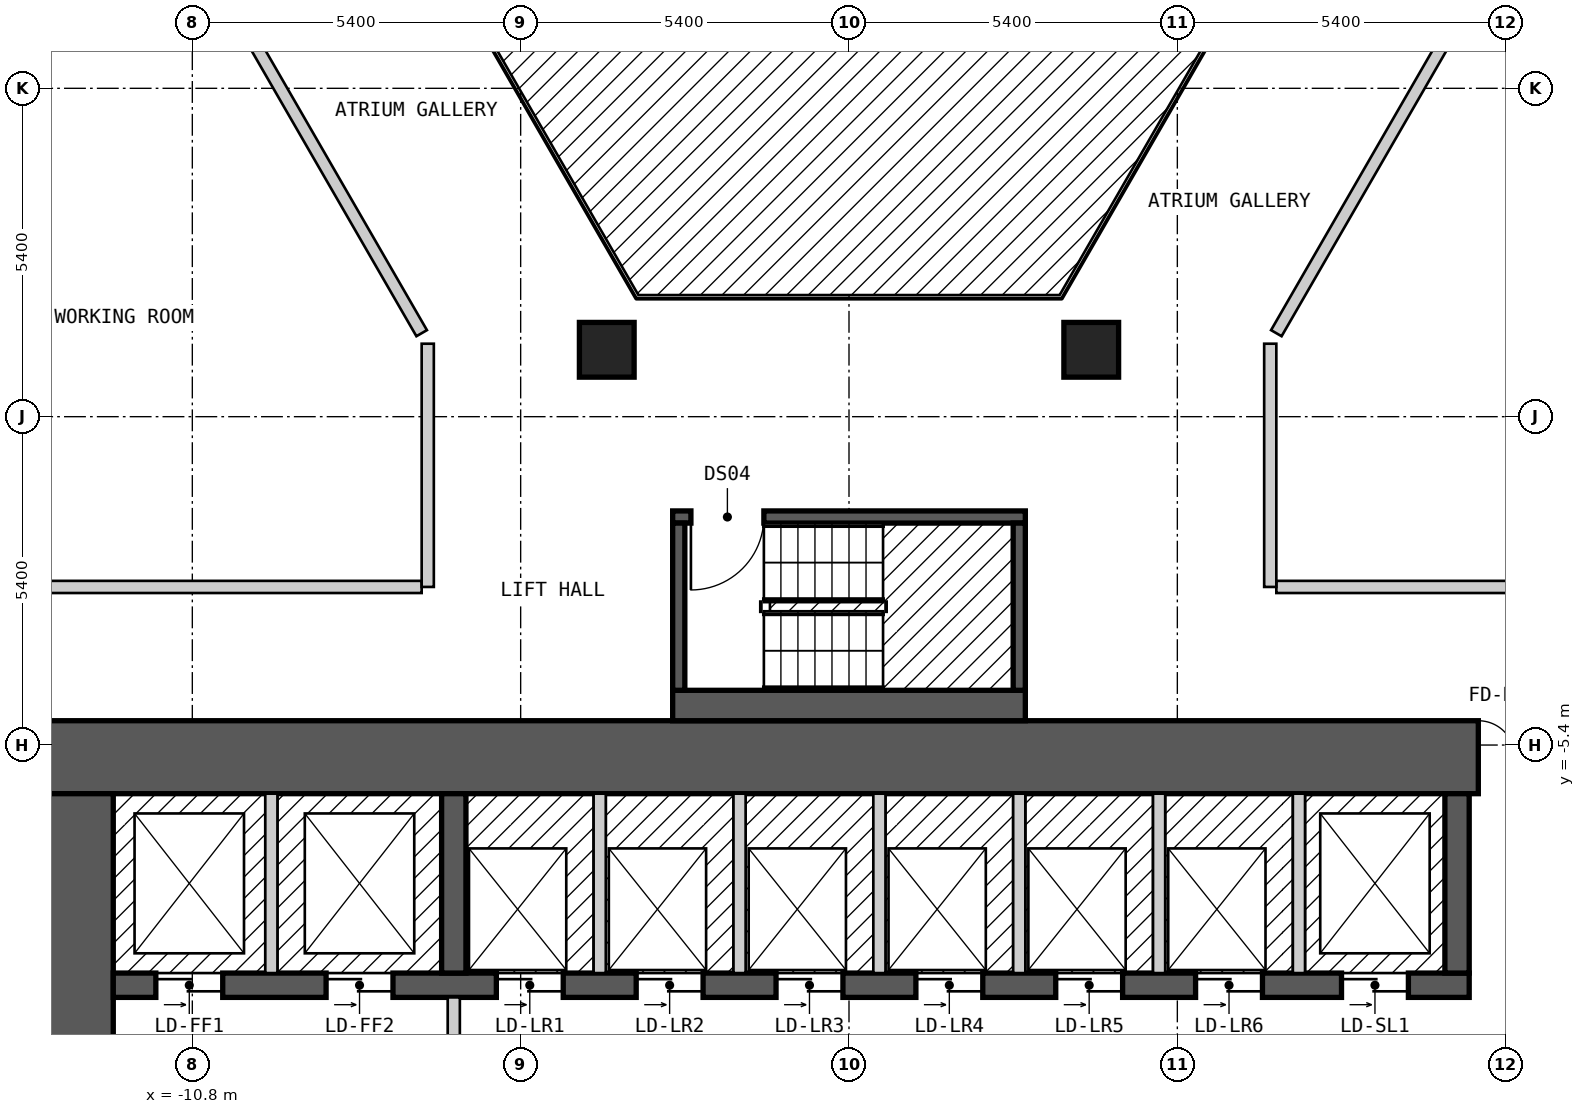
"""IFC4 building model, lengths in metres.
Left out: names, types, materials, properties, quantities, classifications, styles, units other than length and angle.
Written with IfcOpenShell. Run it as: python <this file> out.ifc"""

import sys

from ifc_helpers import new_model, si_unit, direction, frame, frame_2d, origin, origin_2d, place, context, subcontext, project, spatial, rectangle, extrude, element, fill, save


model = new_model("IFC4")
c1 = context("Model", 3, precision=1e-05, world=origin(), true_north=direction((0.0, 1.0)))
c2 = subcontext(c1, "Body", "Model", "MODEL_VIEW")
j1 = project(units=[si_unit("LENGTHUNIT", "METRE"), si_unit("PLANEANGLEUNIT", "RADIAN")], contexts=[c1])
p1 = place(None, origin())
s1 = spatial("IfcSite", under=j1, at=p1, CompositionType="ELEMENT")
p2 = place(p1, origin())
s2 = spatial("IfcBuilding", under=s1, at=p2, CompositionType="ELEMENT")
p3 = place(p2, frame((0.0, 0.0, 32.4)))
s3 = spatial("IfcBuildingStorey", under=s2, at=p3, CompositionType="ELEMENT", Elevation=32.4)
for number, where, z_axis, x_axis in (
    (1, (3.984, 1.1, 0.0), (0.0, 0.0, 1.0), (1.0, 0.0, 0.0)),
    (2, (-3.984, 1.1, 0.0), (0.0, 0.0, 1.0), (1.0, 0.0, 0.0)),
):
    element("IfcColumn", number, at=place(p3, frame(where, z_axis=z_axis, x_axis=x_axis)), inside=s3, PredefinedType="COLUMN", context=c2, shape_type="SweptSolid", body=[
        extrude(rectangle(XDim=0.9, YDim=0.9, at=origin_2d()), origin(), (0.0, 0.0, 1.0), 3.0),
    ])
p4 = place(p3, frame((-13.3, -5.6, 0.0), z_axis=(0.0, 0.0, 1.0), x_axis=(1.0, 0.0, 0.0)))
e3 = element("IfcWall", 3, at=p4, inside=s3, PredefinedType="SHEAR", context=c2, shape_type="SweptSolid", body=[
    extrude(rectangle(XDim=26.6, YDim=1.2, at=frame_2d((13.3, 0.0))), origin(), (0.0, 0.0, 1.0), 2.7),
])
p5 = place(p4, frame((23.65, 0.0, 0.0)))
e4 = element("IfcOpeningElement", 4, at=p5, cuts=e3, PredefinedType="OPENING", context=c2, shape_type="SweptSolid", body=[
    extrude(rectangle(XDim=1.2, YDim=2.1, at=frame_2d((0.6, 1.05))), frame((0.0, 0.61, 0.0), z_axis=(0.0, -1.0, 0.0), x_axis=(1.0, 0.0, 0.0)), (0.0, 0.0, 1.0), 1.22),
])
p6 = place(p3, frame((-12.7, -17.8, 0.0), z_axis=(0.0, 0.0, 1.0), x_axis=(0.0, 1.0, 0.0)))
e5 = element("IfcWall", 5, at=p6, inside=s3, PredefinedType="SHEAR", context=c2, shape_type="SweptSolid", body=[
    extrude(rectangle(XDim=11.6, YDim=1.2, at=frame_2d((5.8, 0.0))), origin(), (0.0, 0.0, 1.0), 2.7),
])
p7 = place(p6, frame((3.6, 0.0, 0.0)))
e6 = element("IfcOpeningElement", 6, at=p7, cuts=e5, PredefinedType="OPENING", context=c2, shape_type="SweptSolid", body=[
    extrude(rectangle(XDim=1.2, YDim=2.1, at=frame_2d((0.6, 1.05))), frame((0.0, 0.61, 0.0), z_axis=(0.0, -1.0, 0.0), x_axis=(1.0, 0.0, 0.0)), (0.0, 0.0, 1.0), 1.22),
])
p8 = place(p3, frame((-12.1, -9.35, 0.0), z_axis=(0.0, 0.0, 1.0), x_axis=(1.0, 0.0, 0.0)))
e7 = element("IfcWall", 7, at=p8, inside=s3, PredefinedType="SHEAR", context=c2, shape_type="SweptSolid", body=[
    extrude(rectangle(XDim=22.3, YDim=0.4, at=frame_2d((11.15, 0.0))), origin(), (0.0, 0.0, 1.0), 2.7),
])
p9 = place(p8, frame((0.7, 0.0, 0.0)))
e8 = element("IfcOpeningElement", 8, at=p9, cuts=e7, PredefinedType="OPENING", context=c2, shape_type="SweptSolid", body=[
    extrude(rectangle(XDim=1.1, YDim=2.1, at=frame_2d((0.55, 1.05))), frame((0.0, 0.21, 0.0), z_axis=(0.0, -1.0, 0.0), x_axis=(1.0, 0.0, 0.0)), (0.0, 0.0, 1.0), 0.42),
])
p10 = place(p8, frame((3.5, 0.0, 0.0)))
e9 = element("IfcOpeningElement", 9, at=p10, cuts=e7, PredefinedType="OPENING", context=c2, shape_type="SweptSolid", body=[
    extrude(rectangle(XDim=1.1, YDim=2.1, at=frame_2d((0.55, 1.05))), frame((0.0, 0.21, 0.0), z_axis=(0.0, -1.0, 0.0), x_axis=(1.0, 0.0, 0.0)), (0.0, 0.0, 1.0), 0.42),
])
p11 = place(p8, frame((6.3, 0.0, 0.0)))
e10 = element("IfcOpeningElement", 10, at=p11, cuts=e7, PredefinedType="OPENING", context=c2, shape_type="SweptSolid", body=[
    extrude(rectangle(XDim=1.1, YDim=2.1, at=frame_2d((0.55, 1.05))), frame((0.0, 0.21, 0.0), z_axis=(0.0, -1.0, 0.0), x_axis=(1.0, 0.0, 0.0)), (0.0, 0.0, 1.0), 0.42),
])
p12 = place(p8, frame((8.6, 0.0, 0.0)))
e11 = element("IfcOpeningElement", 11, at=p12, cuts=e7, PredefinedType="OPENING", context=c2, shape_type="SweptSolid", body=[
    extrude(rectangle(XDim=1.1, YDim=2.1, at=frame_2d((0.55, 1.05))), frame((0.0, 0.21, 0.0), z_axis=(0.0, -1.0, 0.0), x_axis=(1.0, 0.0, 0.0)), (0.0, 0.0, 1.0), 0.42),
])
p13 = place(p8, frame((10.9, 0.0, 0.0)))
e12 = element("IfcOpeningElement", 12, at=p13, cuts=e7, PredefinedType="OPENING", context=c2, shape_type="SweptSolid", body=[
    extrude(rectangle(XDim=1.1, YDim=2.1, at=frame_2d((0.55, 1.05))), frame((0.0, 0.21, 0.0), z_axis=(0.0, -1.0, 0.0), x_axis=(1.0, 0.0, 0.0)), (0.0, 0.0, 1.0), 0.42),
])
p14 = place(p8, frame((13.2, 0.0, 0.0)))
e13 = element("IfcOpeningElement", 13, at=p14, cuts=e7, PredefinedType="OPENING", context=c2, shape_type="SweptSolid", body=[
    extrude(rectangle(XDim=1.1, YDim=2.1, at=frame_2d((0.55, 1.05))), frame((0.0, 0.21, 0.0), z_axis=(0.0, -1.0, 0.0), x_axis=(1.0, 0.0, 0.0)), (0.0, 0.0, 1.0), 0.42),
])
p15 = place(p8, frame((15.5, 0.0, 0.0)))
e14 = element("IfcOpeningElement", 14, at=p15, cuts=e7, PredefinedType="OPENING", context=c2, shape_type="SweptSolid", body=[
    extrude(rectangle(XDim=1.1, YDim=2.1, at=frame_2d((0.55, 1.05))), frame((0.0, 0.21, 0.0), z_axis=(0.0, -1.0, 0.0), x_axis=(1.0, 0.0, 0.0)), (0.0, 0.0, 1.0), 0.42),
])
p16 = place(p8, frame((17.8, 0.0, 0.0)))
e15 = element("IfcOpeningElement", 15, at=p16, cuts=e7, PredefinedType="OPENING", context=c2, shape_type="SweptSolid", body=[
    extrude(rectangle(XDim=1.1, YDim=2.1, at=frame_2d((0.55, 1.05))), frame((0.0, 0.21, 0.0), z_axis=(0.0, -1.0, 0.0), x_axis=(1.0, 0.0, 0.0)), (0.0, 0.0, 1.0), 0.42),
])
p17 = place(p8, frame((20.2, 0.0, 0.0)))
e16 = element("IfcOpeningElement", 16, at=p17, cuts=e7, PredefinedType="OPENING", context=c2, shape_type="SweptSolid", body=[
    extrude(rectangle(XDim=1.1, YDim=2.1, at=frame_2d((0.55, 1.05))), frame((0.0, 0.21, 0.0), z_axis=(0.0, -1.0, 0.0), x_axis=(1.0, 0.0, 0.0)), (0.0, 0.0, 1.0), 0.42),
])
for number, where, z_axis, x_axis in (
    (17, (-6.5, -9.15, 0.0), (0.0, 0.0, 1.0), (0.0, 1.0, 0.0)),
    (18, (10.0, -9.15, 0.0), (0.0, 0.0, 1.0), (0.0, 1.0, 0.0)),
):
    element("IfcWall", number, at=place(p3, frame(where, z_axis=z_axis, x_axis=x_axis)), inside=s3, PredefinedType="SHEAR", context=c2, shape_type="SweptSolid", body=[
        extrude(rectangle(XDim=2.95, YDim=0.4, at=frame_2d((1.475, 0.0))), origin(), (0.0, 0.0, 1.0), 2.7),
    ])
p18 = place(p3, frame((-2.9, -4.75, 0.0), z_axis=(0.0, 0.0, 1.0), x_axis=(1.0, 0.0, 0.0)))
e19 = element("IfcWall", 19, at=p18, inside=s3, PredefinedType="SOLIDWALL", context=c2, shape_type="SweptSolid", body=[
    extrude(rectangle(XDim=5.8, YDim=0.5, at=frame_2d((2.9, 0.0))), origin(), (0.0, 0.0, 1.0), 2.7),
])
p19 = place(p3, frame((-2.9, -1.65, 0.0), z_axis=(0.0, 0.0, 1.0), x_axis=(1.0, 0.0, 0.0)))
e20 = element("IfcWall", 20, at=p19, inside=s3, PredefinedType="SOLIDWALL", context=c2, shape_type="SweptSolid", body=[
    extrude(rectangle(XDim=5.8, YDim=0.2, at=frame_2d((2.9, 0.0))), origin(), (0.0, 0.0, 1.0), 2.7),
])
p20 = place(p19, frame((0.3, 0.0, 0.0)))
e21 = element("IfcOpeningElement", 21, at=p20, cuts=e20, PredefinedType="OPENING", context=c2, shape_type="SweptSolid", body=[
    extrude(rectangle(XDim=1.2, YDim=2.1, at=frame_2d((0.6, 1.05))), frame((0.0, 0.11, 0.0), z_axis=(0.0, -1.0, 0.0), x_axis=(1.0, 0.0, 0.0)), (0.0, 0.0, 1.0), 0.22),
])
for number, where, z_axis, x_axis in (
    (22, (-2.8, -4.5, 0.0), (0.0, 0.0, 1.0), (0.0, 1.0, 0.0)),
    (23, (2.8, -4.5, 0.0), (0.0, 0.0, 1.0), (0.0, 1.0, 0.0)),
):
    element("IfcWall", number, at=place(p3, frame(where, z_axis=z_axis, x_axis=x_axis)), inside=s3, PredefinedType="SOLIDWALL", context=c2, shape_type="SweptSolid", body=[
        extrude(rectangle(XDim=2.75, YDim=0.2, at=frame_2d((1.375, 0.0))), origin(), (0.0, 0.0, 1.0), 2.7),
    ])
p21 = place(p3, frame((-10.796, 7.9, 0.0), z_axis=(0.0, 0.0, 1.0), x_axis=(0.499954271211, -0.866051803703, 0.0)))
e24 = element("IfcWall", 24, at=p21, inside=s3, PredefinedType="PARTITIONING", context=c2, shape_type="SweptSolid", body=[
    extrude(rectangle(XDim=7.536, YDim=0.2, at=frame_2d((3.768, 0.0))), origin(), (0.0, 0.0, 1.0), 2.7),
])
p22 = place(p3, frame((9.18, 15.7, 0.0), z_axis=(0.0, 0.0, 1.0), x_axis=(0.500003652032, -0.866023295272, 0.0)))
e25 = element("IfcWall", 25, at=p22, inside=s3, PredefinedType="PARTITIONING", context=c2, shape_type="SweptSolid", body=[
    extrude(rectangle(XDim=18.012, YDim=0.2, at=frame_2d((9.006, 0.0))), origin(), (0.0, 0.0, 1.0), 2.7),
])
p23 = place(p22, frame((8.556, 0.0, 0.0)))
e26 = element("IfcOpeningElement", 26, at=p23, cuts=e25, PredefinedType="OPENING", context=c2, shape_type="SweptSolid", body=[
    extrude(rectangle(XDim=0.9, YDim=2.1, at=frame_2d((0.45, 1.05))), frame((0.0, 0.11, 0.0), z_axis=(0.0, -1.0, 0.0), x_axis=(1.0, 0.0, 0.0)), (0.0, 0.0, 1.0), 0.22),
])
p24 = place(p3, frame((10.45, 17.9, 0.0), z_axis=(0.0, 0.0, 1.0), x_axis=(0.500034352617, -0.866005569383, 0.0)))
e27 = element("IfcWall", 27, at=p24, inside=s3, PredefinedType="PARTITIONING", context=c2, shape_type="SweptSolid", body=[
    extrude(rectangle(XDim=20.553, YDim=0.2, at=frame_2d((10.276, 0.0))), origin(), (0.0, 0.0, 1.0), 2.7),
])
p25 = place(p24, frame((9.775, 0.0, 0.0)))
e28 = element("IfcOpeningElement", 28, at=p25, cuts=e27, PredefinedType="OPENING", context=c2, shape_type="SweptSolid", body=[
    extrude(rectangle(XDim=1.0, YDim=2.1, at=frame_2d((0.5, 1.05))), frame((0.0, 0.11, 0.0), z_axis=(0.0, -1.0, 0.0), x_axis=(1.0, 0.0, 0.0)), (0.0, 0.0, 1.0), 0.22),
])
p26 = place(p24, frame((0.852, 0.0, 0.0)))
e29 = element("IfcOpeningElement", 29, at=p26, cuts=e27, PredefinedType="OPENING", context=c2, shape_type="SweptSolid", body=[
    extrude(rectangle(XDim=0.8, YDim=2.1, at=frame_2d((0.4, 1.05))), frame((0.0, 0.11, 0.0), z_axis=(0.0, -1.0, 0.0), x_axis=(1.0, 0.0, 0.0)), (0.0, 0.0, 1.0), 0.22),
])
for number, where, z_axis, x_axis in (
    (30, (-15.4, -2.8, 0.0), (0.0, 0.0, 1.0), (1.0, 0.0, 0.0)),
    (31, (7.028, -2.8, 0.0), (0.0, 0.0, 1.0), (1.0, 0.0, 0.0)),
):
    element("IfcWall", number, at=place(p3, frame(where, z_axis=z_axis, x_axis=x_axis)), inside=s3, PredefinedType="PARTITIONING", context=c2, shape_type="SweptSolid", body=[
        extrude(rectangle(XDim=8.372, YDim=0.2, at=frame_2d((4.186, 0.0))), origin(), (0.0, 0.0, 1.0), 2.7),
    ])
p27 = place(p3, frame((7.028, 1.373, 0.0), z_axis=(0.0, 0.0, 1.0), x_axis=(0.49998574534, 0.86603363356, 0.0)))
e32 = element("IfcWall", 32, at=p27, inside=s3, PredefinedType="PARTITIONING", context=c2, shape_type="SweptSolid", body=[
    extrude(rectangle(XDim=7.652, YDim=0.2, at=frame_2d((3.826, 0.0))), origin(), (0.0, 0.0, 1.0), 2.7),
])
p28 = place(p3, frame((-18.244, -0.001, 0.0), z_axis=(0.0, 0.0, 1.0), x_axis=(0.499962999376, 0.866046765051, 0.0)))
e33 = element("IfcWall", 33, at=p28, inside=s3, PredefinedType="PARTITIONING", context=c2, shape_type="SweptSolid", body=[
    extrude(rectangle(XDim=18.245, YDim=0.2, at=frame_2d((9.123, 0.0))), origin(), (0.0, 0.0, 1.0), 2.7),
])
p29 = place(p28, frame((8.672, 0.0, 0.0)))
e34 = element("IfcOpeningElement", 34, at=p29, cuts=e33, PredefinedType="OPENING", context=c2, shape_type="SweptSolid", body=[
    extrude(rectangle(XDim=0.9, YDim=2.1, at=frame_2d((0.45, 1.05))), frame((0.0, 0.11, 0.0), z_axis=(0.0, -1.0, 0.0), x_axis=(1.0, 0.0, 0.0)), (0.0, 0.0, 1.0), 0.22),
])
p30 = place(p3, frame((-20.727, 0.099, 0.0), z_axis=(0.0, 0.0, 1.0), x_axis=(0.499993204491, 0.866029327138, 0.0)))
e35 = element("IfcWall", 35, at=p30, inside=s3, PredefinedType="PARTITIONING", context=c2, shape_type="SweptSolid", body=[
    extrude(rectangle(XDim=20.554, YDim=0.2, at=frame_2d((10.277, 0.0))), origin(), (0.0, 0.0, 1.0), 2.7),
])
p31 = place(p30, frame((18.916, 0.0, 0.0)))
e36 = element("IfcOpeningElement", 36, at=p31, cuts=e35, PredefinedType="OPENING", context=c2, shape_type="SweptSolid", body=[
    extrude(rectangle(XDim=0.8, YDim=2.1, at=frame_2d((0.4, 1.05))), frame((0.0, 0.11, 0.0), z_axis=(0.0, -1.0, 0.0), x_axis=(1.0, 0.0, 0.0)), (0.0, 0.0, 1.0), 0.22),
])
p32 = place(p30, frame((14.88, 0.0, 0.0)))
e37 = element("IfcOpeningElement", 37, at=p32, cuts=e35, PredefinedType="OPENING", context=c2, shape_type="SweptSolid", body=[
    extrude(rectangle(XDim=1.0, YDim=2.1, at=frame_2d((0.5, 1.05))), frame((0.0, 0.11, 0.0), z_axis=(0.0, -1.0, 0.0), x_axis=(1.0, 0.0, 0.0)), (0.0, 0.0, 1.0), 0.22),
])
p33 = place(p30, frame((9.776, 0.0, 0.0)))
e38 = element("IfcOpeningElement", 38, at=p33, cuts=e35, PredefinedType="OPENING", context=c2, shape_type="SweptSolid", body=[
    extrude(rectangle(XDim=1.0, YDim=2.1, at=frame_2d((0.5, 1.05))), frame((0.0, 0.11, 0.0), z_axis=(0.0, -1.0, 0.0), x_axis=(1.0, 0.0, 0.0)), (0.0, 0.0, 1.0), 0.22),
])
p34 = place(p30, frame((4.673, 0.0, 0.0)))
e39 = element("IfcOpeningElement", 39, at=p34, cuts=e35, PredefinedType="OPENING", context=c2, shape_type="SweptSolid", body=[
    extrude(rectangle(XDim=1.0, YDim=2.1, at=frame_2d((0.5, 1.05))), frame((0.0, 0.11, 0.0), z_axis=(0.0, -1.0, 0.0), x_axis=(1.0, 0.0, 0.0)), (0.0, 0.0, 1.0), 0.22),
])
p35 = place(p30, frame((0.838, 0.0, 0.0)))
e40 = element("IfcOpeningElement", 40, at=p35, cuts=e35, PredefinedType="OPENING", context=c2, shape_type="SweptSolid", body=[
    extrude(rectangle(XDim=0.8, YDim=2.1, at=frame_2d((0.4, 1.05))), frame((0.0, 0.11, 0.0), z_axis=(0.0, -1.0, 0.0), x_axis=(1.0, 0.0, 0.0)), (0.0, 0.0, 1.0), 0.22),
])
for number, where, z_axis, x_axis in (
    (41, (6.928, -2.8, 0.0), (0.0, 0.0, 1.0), (0.0, 1.0, 0.0)),
    (42, (-6.928, -2.8, 0.0), (0.0, 0.0, 1.0), (0.0, 1.0, 0.0)),
):
    element("IfcWall", number, at=place(p3, frame(where, z_axis=z_axis, x_axis=x_axis)), inside=s3, PredefinedType="PARTITIONING", context=c2, shape_type="SweptSolid", body=[
        extrude(rectangle(XDim=4.0, YDim=0.2, at=frame_2d((2.0, 0.0))), origin(), (0.0, 0.0, 1.0), 2.7),
    ])
p36 = place(p3, frame((-9.5, -9.15, 0.0), z_axis=(0.0, 0.0, 1.0), x_axis=(0.0, 1.0, 0.0)))
e43 = element("IfcWall", 43, at=p36, inside=s3, PredefinedType="SOLIDWALL", context=c2, shape_type="SweptSolid", body=[
    extrude(rectangle(XDim=2.95, YDim=0.2, at=frame_2d((1.475, 0.0))), origin(), (0.0, 0.0, 1.0), 2.7),
])
p37 = place(p3, frame((-6.5, -14.45, 0.0), z_axis=(0.0, 0.0, 1.0), x_axis=(0.0, 1.0, 0.0)))
e44 = element("IfcWall", 44, at=p37, inside=s3, PredefinedType="PARTITIONING", context=c2, shape_type="SweptSolid", body=[
    extrude(rectangle(XDim=4.9, YDim=0.2, at=frame_2d((2.45, 0.0))), origin(), (0.0, 0.0, 1.0), 2.7),
])
p38 = place(p37, frame((3.15, 0.0, 0.0), z_axis=(0.0, 0.0, 1.0), x_axis=(-1.0, 0.0, 0.0)))
e45 = element("IfcOpeningElement", 45, at=p38, cuts=e44, PredefinedType="OPENING", context=c2, shape_type="SweptSolid", body=[
    extrude(rectangle(XDim=1.4, YDim=2.1, at=frame_2d((0.7, 1.05))), frame((0.0, 0.11, 0.0), z_axis=(0.0, -1.0, 0.0), x_axis=(1.0, 0.0, 0.0)), (0.0, 0.0, 1.0), 0.22),
])
for number, where, z_axis, x_axis in (
    (46, (-4.1, -9.15, 0.0), (0.0, 0.0, 1.0), (0.0, 1.0, 0.0)),
    (47, (-1.8, -9.15, 0.0), (0.0, 0.0, 1.0), (0.0, 1.0, 0.0)),
    (48, (0.5, -9.15, 0.0), (0.0, 0.0, 1.0), (0.0, 1.0, 0.0)),
    (49, (2.8, -9.15, 0.0), (0.0, 0.0, 1.0), (0.0, 1.0, 0.0)),
    (50, (5.1, -9.15, 0.0), (0.0, 0.0, 1.0), (0.0, 1.0, 0.0)),
    (51, (7.4, -9.15, 0.0), (0.0, 0.0, 1.0), (0.0, 1.0, 0.0)),
):
    element("IfcWall", number, at=place(p3, frame(where, z_axis=z_axis, x_axis=x_axis)), inside=s3, PredefinedType="SOLIDWALL", context=c2, shape_type="SweptSolid", body=[
        extrude(rectangle(XDim=2.95, YDim=0.2, at=frame_2d((1.475, 0.0))), origin(), (0.0, 0.0, 1.0), 2.7),
    ])
p39 = place(p20, origin())
e52 = element("IfcDoor", 52, at=p39, inside=s3, OperationType="SINGLE_SWING_LEFT", PredefinedType="DOOR", context=c2, shape_type="SweptSolid", body=[
    extrude(rectangle(XDim=1.2, YDim=2.1, at=frame_2d((0.6, 1.05))), frame((0.0, 0.025, 0.0), z_axis=(0.0, -1.0, 0.0), x_axis=(1.0, 0.0, 0.0)), (0.0, 0.0, 1.0), 0.05),
])
fill(e21, e52)
p40 = place(p9, origin())
e53 = element("IfcDoor", 53, at=p40, inside=s3, OperationType="DOUBLE_DOOR_SLIDING", PredefinedType="DOOR", context=c2, shape_type="SweptSolid", body=[
    extrude(rectangle(XDim=1.1, YDim=2.1, at=frame_2d((0.55, 1.05))), frame((0.0, 0.025, 0.0), z_axis=(0.0, -1.0, 0.0), x_axis=(1.0, 0.0, 0.0)), (0.0, 0.0, 1.0), 0.05),
])
fill(e8, e53)
p41 = place(p10, origin())
e54 = element("IfcDoor", 54, at=p41, inside=s3, OperationType="DOUBLE_DOOR_SLIDING", PredefinedType="DOOR", context=c2, shape_type="SweptSolid", body=[
    extrude(rectangle(XDim=1.1, YDim=2.1, at=frame_2d((0.55, 1.05))), frame((0.0, 0.025, 0.0), z_axis=(0.0, -1.0, 0.0), x_axis=(1.0, 0.0, 0.0)), (0.0, 0.0, 1.0), 0.05),
])
fill(e9, e54)
p42 = place(p11, origin())
e55 = element("IfcDoor", 55, at=p42, inside=s3, OperationType="DOUBLE_DOOR_SLIDING", PredefinedType="DOOR", context=c2, shape_type="SweptSolid", body=[
    extrude(rectangle(XDim=1.1, YDim=2.1, at=frame_2d((0.55, 1.05))), frame((0.0, 0.025, 0.0), z_axis=(0.0, -1.0, 0.0), x_axis=(1.0, 0.0, 0.0)), (0.0, 0.0, 1.0), 0.05),
])
fill(e10, e55)
p43 = place(p12, origin())
e56 = element("IfcDoor", 56, at=p43, inside=s3, OperationType="DOUBLE_DOOR_SLIDING", PredefinedType="DOOR", context=c2, shape_type="SweptSolid", body=[
    extrude(rectangle(XDim=1.1, YDim=2.1, at=frame_2d((0.55, 1.05))), frame((0.0, 0.025, 0.0), z_axis=(0.0, -1.0, 0.0), x_axis=(1.0, 0.0, 0.0)), (0.0, 0.0, 1.0), 0.05),
])
fill(e11, e56)
p44 = place(p13, origin())
e57 = element("IfcDoor", 57, at=p44, inside=s3, OperationType="DOUBLE_DOOR_SLIDING", PredefinedType="DOOR", context=c2, shape_type="SweptSolid", body=[
    extrude(rectangle(XDim=1.1, YDim=2.1, at=frame_2d((0.55, 1.05))), frame((0.0, 0.025, 0.0), z_axis=(0.0, -1.0, 0.0), x_axis=(1.0, 0.0, 0.0)), (0.0, 0.0, 1.0), 0.05),
])
fill(e12, e57)
p45 = place(p14, origin())
e58 = element("IfcDoor", 58, at=p45, inside=s3, OperationType="DOUBLE_DOOR_SLIDING", PredefinedType="DOOR", context=c2, shape_type="SweptSolid", body=[
    extrude(rectangle(XDim=1.1, YDim=2.1, at=frame_2d((0.55, 1.05))), frame((0.0, 0.025, 0.0), z_axis=(0.0, -1.0, 0.0), x_axis=(1.0, 0.0, 0.0)), (0.0, 0.0, 1.0), 0.05),
])
fill(e13, e58)
p46 = place(p15, origin())
e59 = element("IfcDoor", 59, at=p46, inside=s3, OperationType="DOUBLE_DOOR_SLIDING", PredefinedType="DOOR", context=c2, shape_type="SweptSolid", body=[
    extrude(rectangle(XDim=1.1, YDim=2.1, at=frame_2d((0.55, 1.05))), frame((0.0, 0.025, 0.0), z_axis=(0.0, -1.0, 0.0), x_axis=(1.0, 0.0, 0.0)), (0.0, 0.0, 1.0), 0.05),
])
fill(e14, e59)
p47 = place(p16, origin())
e60 = element("IfcDoor", 60, at=p47, inside=s3, OperationType="DOUBLE_DOOR_SLIDING", PredefinedType="DOOR", context=c2, shape_type="SweptSolid", body=[
    extrude(rectangle(XDim=1.1, YDim=2.1, at=frame_2d((0.55, 1.05))), frame((0.0, 0.025, 0.0), z_axis=(0.0, -1.0, 0.0), x_axis=(1.0, 0.0, 0.0)), (0.0, 0.0, 1.0), 0.05),
])
fill(e15, e60)
p48 = place(p17, origin())
e61 = element("IfcDoor", 61, at=p48, inside=s3, OperationType="DOUBLE_DOOR_SLIDING", PredefinedType="DOOR", context=c2, shape_type="SweptSolid", body=[
    extrude(rectangle(XDim=1.1, YDim=2.1, at=frame_2d((0.55, 1.05))), frame((0.0, 0.025, 0.0), z_axis=(0.0, -1.0, 0.0), x_axis=(1.0, 0.0, 0.0)), (0.0, 0.0, 1.0), 0.05),
])
fill(e16, e61)
p49 = place(p5, origin())
e62 = element("IfcDoor", 62, at=p49, inside=s3, OperationType="DOUBLE_DOOR_SINGLE_SWING", PredefinedType="DOOR", context=c2, shape_type="SweptSolid", body=[
    extrude(rectangle(XDim=1.2, YDim=2.1, at=frame_2d((0.6, 1.05))), frame((0.0, 0.025, 0.0), z_axis=(0.0, -1.0, 0.0), x_axis=(1.0, 0.0, 0.0)), (0.0, 0.0, 1.0), 0.05),
])
fill(e4, e62)
save(model, sys.argv[1])
